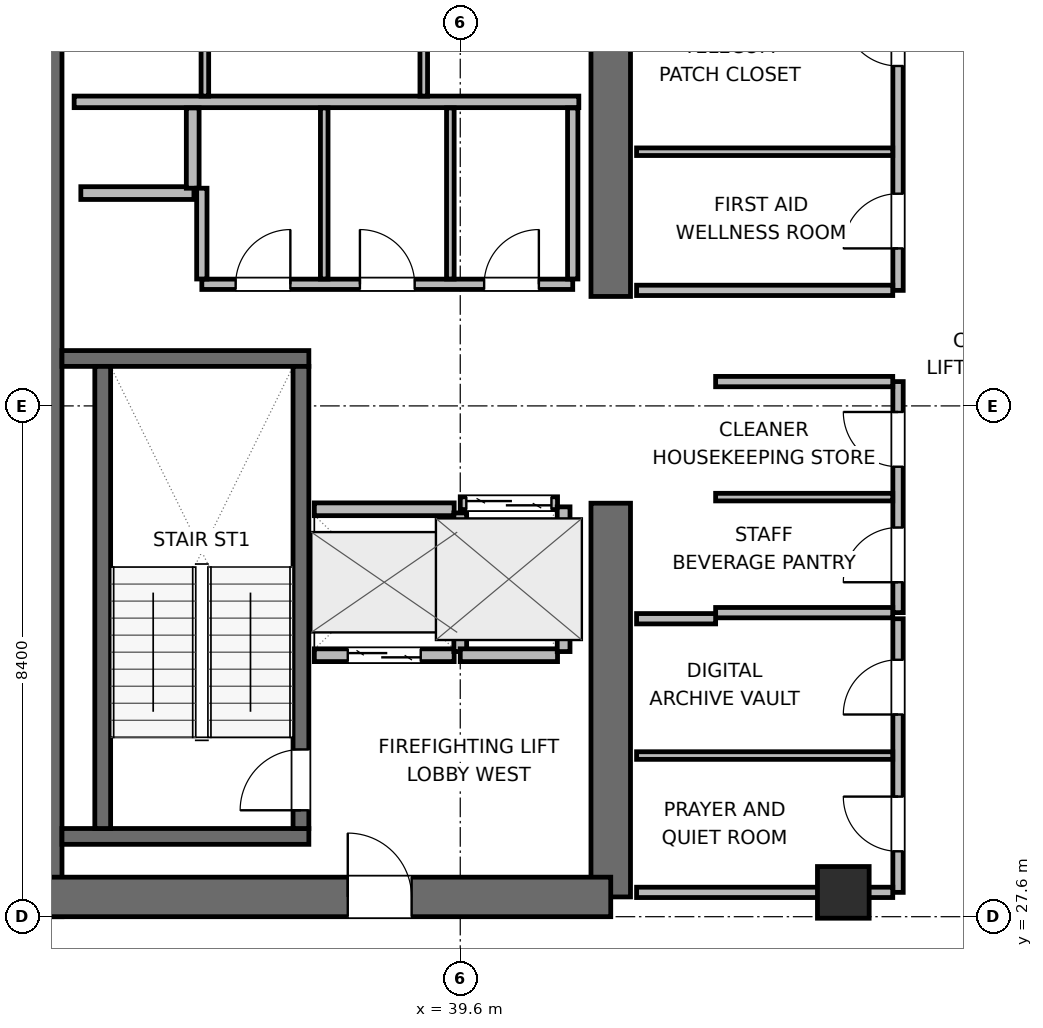
"""IFC4 building model, lengths in metres.
Left out: names, types, materials, properties, quantities, classifications, styles, units other than length and angle.
Written with IfcOpenShell. Run it as: python <this file> out.ifc"""

import sys

from ifc_helpers import new_model, si_unit, direction, frame, frame_2d, origin, origin_2d, place, context, subcontext, project, spatial, rectangle, extrude, element, fill, save


model = new_model("IFC4")
c1 = context("Model", 3, precision=1e-05, world=origin(), true_north=direction((0.0, 1.0)))
c2 = subcontext(c1, "Body", "Model", "MODEL_VIEW")
j1 = project(units=[si_unit("LENGTHUNIT", "METRE"), si_unit("PLANEANGLEUNIT", "RADIAN")], contexts=[c1])
p1 = place(None, origin())
s1 = spatial("IfcSite", under=j1, at=p1, CompositionType="ELEMENT")
p2 = place(p1, origin())
s2 = spatial("IfcBuilding", under=s1, at=p2, CompositionType="ELEMENT")
p3 = place(p2, frame((0.0, 0.0, 247.2)))
s3 = spatial("IfcBuildingStorey", under=s2, at=p3, CompositionType="ELEMENT", Elevation=247.2)
p4 = place(p3, frame((32.725, 27.6, 0.0), z_axis=(0.0, 0.0, 1.0), x_axis=(0.0, 1.0, 0.0)))
e1 = element("IfcWall", 1, at=p4, inside=s3, PredefinedType="SHEAR", context=c2, shape_type="SweptSolid", body=[
    extrude(rectangle(XDim=16.8, YDim=0.65, at=frame_2d((8.4, 0.0))), origin(), (0.0, 0.0, 1.0), 3.9),
])
p5 = place(p3, frame((42.075, 27.925, 0.0), z_axis=(0.0, 0.0, 1.0), x_axis=(0.0, 1.0, 0.0)))
e2 = element("IfcWall", 2, at=p5, inside=s3, PredefinedType="SHEAR", context=c2, shape_type="SweptSolid", body=[
    extrude(rectangle(XDim=6.475, YDim=0.65, at=frame_2d((3.237, 0.0))), origin(), (0.0, 0.0, 1.0), 3.9),
])
p6 = place(p3, frame((42.075, 37.8, 0.0), z_axis=(0.0, 0.0, 1.0), x_axis=(0.0, 1.0, 0.0)))
e3 = element("IfcWall", 3, at=p6, inside=s3, PredefinedType="SHEAR", context=c2, shape_type="SweptSolid", body=[
    extrude(rectangle(XDim=6.275, YDim=0.65, at=frame_2d((3.137, 0.0))), origin(), (0.0, 0.0, 1.0), 3.9),
])
p7 = place(p3, frame((32.725, 27.925, 0.0), z_axis=(0.0, 0.0, 1.0), x_axis=(1.0, 0.0, 0.0)))
e4 = element("IfcWall", 4, at=p7, inside=s3, PredefinedType="SHEAR", context=c2, shape_type="SweptSolid", body=[
    extrude(rectangle(XDim=9.35, YDim=0.65, at=frame_2d((4.675, 0.0))), origin(), (0.0, 0.0, 1.0), 3.9),
])
p8 = place(p7, frame((5.025, 0.0, 0.0)))
e5 = element("IfcOpeningElement", 5, at=p8, cuts=e4, PredefinedType="OPENING", context=c2, shape_type="SweptSolid", body=[
    extrude(rectangle(XDim=1.05, YDim=2.04, at=frame_2d((0.525, 1.02))), frame((0.0, 0.335, 0.0), z_axis=(0.0, -1.0, 0.0), x_axis=(1.0, 0.0, 0.0)), (0.0, 0.0, 1.0), 0.67),
])
for number, where, z_axis, x_axis in (
    (6, (33.05, 28.92, 0.0), (0.0, 0.0, 1.0), (1.0, 0.0, 0.0)),
    (7, (33.05, 36.78, 0.0), (0.0, 0.0, 1.0), (1.0, 0.0, 0.0)),
):
    element("IfcWall", number, at=place(p3, frame(where, z_axis=z_axis, x_axis=x_axis)), inside=s3, PredefinedType="SHEAR", context=c2, shape_type="SweptSolid", body=[
        extrude(rectangle(XDim=4.06, YDim=0.26, at=frame_2d((2.03, 0.0))), origin(), (0.0, 0.0, 1.0), 3.9),
    ])
p9 = place(p3, frame((33.72, 29.05, 0.0), z_axis=(0.0, 0.0, 1.0), x_axis=(0.0, 1.0, 0.0)))
e8 = element("IfcWall", 8, at=p9, inside=s3, PredefinedType="SHEAR", context=c2, shape_type="SweptSolid", body=[
    extrude(rectangle(XDim=7.6, YDim=0.26, at=frame_2d((3.8, 0.0))), origin(), (0.0, 0.0, 1.0), 3.9),
])
p10 = place(p3, frame((36.98, 29.05, 0.0), z_axis=(0.0, 0.0, 1.0), x_axis=(0.0, 1.0, 0.0)))
e9 = element("IfcWall", 9, at=p10, inside=s3, PredefinedType="SHEAR", context=c2, shape_type="SweptSolid", body=[
    extrude(rectangle(XDim=7.6, YDim=0.26, at=frame_2d((3.8, 0.0))), origin(), (0.0, 0.0, 1.0), 3.9),
])
p11 = place(p10, frame((0.3, 0.0, 0.0)))
e10 = element("IfcOpeningElement", 10, at=p11, cuts=e9, PredefinedType="OPENING", context=c2, shape_type="SweptSolid", body=[
    extrude(rectangle(XDim=1.0, YDim=2.04, at=frame_2d((0.5, 1.02))), frame((0.0, 0.14, 0.0), z_axis=(0.0, -1.0, 0.0), x_axis=(1.0, 0.0, 0.0)), (0.0, 0.0, 1.0), 0.28),
])
p12 = place(p3, frame((45.9, 28.0, 0.0), z_axis=(0.0, 0.0, 1.0), x_axis=(1.0, 0.0, 0.0)))
e11 = element("IfcColumn", 11, at=p12, inside=s3, PredefinedType="COLUMN", context=c2, shape_type="SweptSolid", body=[
    extrude(rectangle(XDim=0.85, YDim=0.85, at=origin_2d()), origin(), (0.0, 0.0, 1.0), 3.9),
])
p13 = place(p3, frame((33.25, 41.0, 0.0), z_axis=(0.0, 0.0, 1.0), x_axis=(1.0, 0.0, 0.0)))
e12 = element("IfcWall", 12, at=p13, inside=s3, PredefinedType="PLUMBINGWALL", context=c2, shape_type="SweptSolid", body=[
    extrude(rectangle(XDim=8.3, YDim=0.19, at=frame_2d((4.15, 0.0))), origin(), (0.0, 0.0, 1.0), 3.68),
])
for number, where, z_axis, x_axis in (
    (13, (35.4, 41.095, 0.0), (0.0, 0.0, 1.0), (0.0, 1.0, 0.0)),
    (14, (39.0, 41.095, 0.0), (0.0, 0.0, 1.0), (0.0, 1.0, 0.0)),
):
    element("IfcWall", number, at=place(p3, frame(where, z_axis=z_axis, x_axis=x_axis)), inside=s3, PredefinedType="PARTITIONING", context=c2, shape_type="SweptSolid", body=[
        extrude(rectangle(XDim=2.455, YDim=0.125, at=frame_2d((1.228, 0.0))), origin(), (0.0, 0.0, 1.0), 3.68),
    ])
p14 = place(p3, frame((33.36, 39.5, 0.0), z_axis=(0.0, 0.0, 1.0), x_axis=(1.0, 0.0, 0.0)))
e15 = element("IfcWall", 15, at=p14, inside=s3, PredefinedType="PARTITIONING", context=c2, shape_type="SweptSolid", body=[
    extrude(rectangle(XDim=1.86, YDim=0.21, at=frame_2d((0.93, 0.0))), origin(), (0.0, 0.0, 1.0), 3.68),
])
p15 = place(p3, frame((35.2, 39.58, 0.0), z_axis=(0.0, 0.0, 1.0), x_axis=(0.0, 1.0, 0.0)))
e16 = element("IfcWall", 16, at=p15, inside=s3, PredefinedType="PARTITIONING", context=c2, shape_type="SweptSolid", body=[
    extrude(rectangle(XDim=1.32, YDim=0.21, at=frame_2d((0.66, 0.0))), origin(), (0.0, 0.0, 1.0), 3.68),
])
p16 = place(p3, frame((37.2, 31.9, 0.0), z_axis=(0.0, 0.0, 1.0), x_axis=(1.0, 0.0, 0.0)))
e17 = element("IfcWall", 17, at=p16, inside=s3, PredefinedType="PARTITIONING", context=c2, shape_type="SweptSolid", body=[
    extrude(rectangle(XDim=2.3, YDim=0.21, at=frame_2d((1.15, 0.0))), origin(), (0.0, 0.0, 1.0), 3.68),
])
p17 = place(p16, frame((0.55, 0.0, 0.0)))
e18 = element("IfcOpeningElement", 18, at=p17, cuts=e17, PredefinedType="OPENING", context=c2, shape_type="SweptSolid", body=[
    extrude(rectangle(XDim=1.2, YDim=2.04, at=frame_2d((0.6, 1.02))), frame((0.0, 0.115, 0.0), z_axis=(0.0, -1.0, 0.0), x_axis=(1.0, 0.0, 0.0)), (0.0, 0.0, 1.0), 0.23),
])
p18 = place(p3, frame((37.2, 34.3, 0.0), z_axis=(0.0, 0.0, 1.0), x_axis=(1.0, 0.0, 0.0)))
e19 = element("IfcWall", 19, at=p18, inside=s3, PredefinedType="PARTITIONING", context=c2, shape_type="SweptSolid", body=[
    extrude(rectangle(XDim=2.3, YDim=0.21, at=frame_2d((1.15, 0.0))), origin(), (0.0, 0.0, 1.0), 3.68),
])
p19 = place(p3, frame((39.6, 31.96, 0.0), z_axis=(0.0, 0.0, 1.0), x_axis=(0.0, 1.0, 0.0)))
e20 = element("IfcWall", 20, at=p19, inside=s3, PredefinedType="PARTITIONING", context=c2, shape_type="SweptSolid", body=[
    extrude(rectangle(XDim=2.28, YDim=0.21, at=frame_2d((1.14, 0.0))), origin(), (0.0, 0.0, 1.0), 3.68),
])
p20 = place(p3, frame((39.6, 34.4, 0.0), z_axis=(0.0, 0.0, 1.0), x_axis=(1.0, 0.0, 0.0)))
e21 = element("IfcWall", 21, at=p20, inside=s3, PredefinedType="PARTITIONING", context=c2, shape_type="SweptSolid", body=[
    extrude(rectangle(XDim=1.6, YDim=0.21, at=frame_2d((0.8, 0.0))), origin(), (0.0, 0.0, 1.0), 3.68),
])
p21 = place(p20, frame((0.1, 0.0, 0.0)))
e22 = element("IfcOpeningElement", 22, at=p21, cuts=e21, PredefinedType="OPENING", context=c2, shape_type="SweptSolid", body=[
    extrude(rectangle(XDim=1.4, YDim=2.06, at=frame_2d((0.7, 1.03))), frame((0.0, 0.115, 0.0), z_axis=(0.0, -1.0, 0.0), x_axis=(1.0, 0.0, 0.0)), (0.0, 0.0, 1.0), 0.23),
])
p22 = place(p3, frame((39.6, 31.9, 0.0), z_axis=(0.0, 0.0, 1.0), x_axis=(1.0, 0.0, 0.0)))
e23 = element("IfcWall", 23, at=p22, inside=s3, PredefinedType="PARTITIONING", context=c2, shape_type="SweptSolid", body=[
    extrude(rectangle(XDim=1.6, YDim=0.21, at=frame_2d((0.8, 0.0))), origin(), (0.0, 0.0, 1.0), 3.68),
])
p23 = place(p3, frame((41.3, 31.96, 0.0), z_axis=(0.0, 0.0, 1.0), x_axis=(0.0, 1.0, 0.0)))
e24 = element("IfcWall", 24, at=p23, inside=s3, PredefinedType="PARTITIONING", context=c2, shape_type="SweptSolid", body=[
    extrude(rectangle(XDim=2.38, YDim=0.21, at=frame_2d((1.19, 0.0))), origin(), (0.0, 0.0, 1.0), 3.68),
])
p24 = place(p3, frame((35.35, 38.0, 0.0), z_axis=(0.0, 0.0, 1.0), x_axis=(1.0, 0.0, 0.0)))
e25 = element("IfcWall", 25, at=p24, inside=s3, PredefinedType="PARTITIONING", context=c2, shape_type="SweptSolid", body=[
    extrude(rectangle(XDim=6.1, YDim=0.17, at=frame_2d((3.05, 0.0))), origin(), (0.0, 0.0, 1.0), 3.68),
])
p25 = place(p24, frame((0.556, 0.0, 0.0)))
e26 = element("IfcOpeningElement", 26, at=p25, cuts=e25, PredefinedType="OPENING", context=c2, shape_type="SweptSolid", body=[
    extrude(rectangle(XDim=0.9, YDim=2.02, at=frame_2d((0.45, 1.01))), frame((0.0, 0.095, 0.0), z_axis=(0.0, -1.0, 0.0), x_axis=(1.0, 0.0, 0.0)), (0.0, 0.0, 1.0), 0.19),
])
p26 = place(p24, frame((2.6, 0.0, 0.0)))
e27 = element("IfcOpeningElement", 27, at=p26, cuts=e25, PredefinedType="OPENING", context=c2, shape_type="SweptSolid", body=[
    extrude(rectangle(XDim=0.9, YDim=2.02, at=frame_2d((0.45, 1.01))), frame((0.0, 0.095, 0.0), z_axis=(0.0, -1.0, 0.0), x_axis=(1.0, 0.0, 0.0)), (0.0, 0.0, 1.0), 0.19),
])
p27 = place(p24, frame((4.643, 0.0, 0.0)))
e28 = element("IfcOpeningElement", 28, at=p27, cuts=e25, PredefinedType="OPENING", context=c2, shape_type="SweptSolid", body=[
    extrude(rectangle(XDim=0.9, YDim=2.02, at=frame_2d((0.45, 1.01))), frame((0.0, 0.095, 0.0), z_axis=(0.0, -1.0, 0.0), x_axis=(1.0, 0.0, 0.0)), (0.0, 0.0, 1.0), 0.19),
])
p28 = place(p3, frame((35.35, 38.087, 0.0), z_axis=(0.0, 0.0, 1.0), x_axis=(0.0, 1.0, 0.0)))
e29 = element("IfcWall", 29, at=p28, inside=s3, PredefinedType="PARTITIONING", context=c2, shape_type="SweptSolid", body=[
    extrude(rectangle(XDim=1.493, YDim=0.17, at=frame_2d((0.747, 0.0))), origin(), (0.0, 0.0, 1.0), 3.68),
])
p29 = place(p3, frame((41.45, 38.087, 0.0), z_axis=(0.0, 0.0, 1.0), x_axis=(0.0, 1.0, 0.0)))
e30 = element("IfcWall", 30, at=p29, inside=s3, PredefinedType="PARTITIONING", context=c2, shape_type="SweptSolid", body=[
    extrude(rectangle(XDim=2.813, YDim=0.17, at=frame_2d((1.406, 0.0))), origin(), (0.0, 0.0, 1.0), 3.68),
])
for number, where, z_axis, x_axis in (
    (31, (37.363, 38.087, 0.0), (0.0, 0.0, 1.0), (0.0, 1.0, 0.0)),
    (32, (39.437, 38.087, 0.0), (0.0, 0.0, 1.0), (0.0, 1.0, 0.0)),
):
    element("IfcWall", number, at=place(p3, frame(where, z_axis=z_axis, x_axis=x_axis)), inside=s3, PredefinedType="PARTITIONING", context=c2, shape_type="SweptSolid", body=[
        extrude(rectangle(XDim=2.813, YDim=0.125, at=frame_2d((1.406, 0.0))), origin(), (0.0, 0.0, 1.0), 3.68),
    ])
p30 = place(p3, frame((46.8, 32.6, 0.0), z_axis=(0.0, 0.0, 1.0), x_axis=(0.0, 1.0, 0.0)))
e33 = element("IfcWall", 33, at=p30, inside=s3, PredefinedType="PARTITIONING", context=c2, shape_type="SweptSolid", body=[
    extrude(rectangle(XDim=3.8, YDim=0.17, at=frame_2d((1.9, 0.0))), origin(), (0.0, 0.0, 1.0), 3.68),
])
p31 = place(p30, frame((0.5, 0.0, 0.0)))
e34 = element("IfcOpeningElement", 34, at=p31, cuts=e33, PredefinedType="OPENING", context=c2, shape_type="SweptSolid", body=[
    extrude(rectangle(XDim=0.9, YDim=2.02, at=frame_2d((0.45, 1.01))), frame((0.0, 0.095, 0.0), z_axis=(0.0, -1.0, 0.0), x_axis=(1.0, 0.0, 0.0)), (0.0, 0.0, 1.0), 0.19),
])
p32 = place(p30, frame((2.4, 0.0, 0.0)))
e35 = element("IfcOpeningElement", 35, at=p32, cuts=e33, PredefinedType="OPENING", context=c2, shape_type="SweptSolid", body=[
    extrude(rectangle(XDim=0.9, YDim=2.02, at=frame_2d((0.45, 1.01))), frame((0.0, 0.095, 0.0), z_axis=(0.0, -1.0, 0.0), x_axis=(1.0, 0.0, 0.0)), (0.0, 0.0, 1.0), 0.19),
])
for number, where, z_axis, x_axis in (
    (36, (43.8, 32.6, 0.0), (0.0, 0.0, 1.0), (1.0, 0.0, 0.0)),
    (37, (43.8, 36.4, 0.0), (0.0, 0.0, 1.0), (1.0, 0.0, 0.0)),
):
    element("IfcWall", number, at=place(p3, frame(where, z_axis=z_axis, x_axis=x_axis)), inside=s3, PredefinedType="PARTITIONING", context=c2, shape_type="SweptSolid", body=[
        extrude(rectangle(XDim=2.913, YDim=0.17, at=frame_2d((1.457, 0.0))), origin(), (0.0, 0.0, 1.0), 3.68),
    ])
p33 = place(p3, frame((43.8, 34.5, 0.0), z_axis=(0.0, 0.0, 1.0), x_axis=(1.0, 0.0, 0.0)))
e38 = element("IfcWall", 38, at=p33, inside=s3, PredefinedType="PARTITIONING", context=c2, shape_type="SweptSolid", body=[
    extrude(rectangle(XDim=2.913, YDim=0.125, at=frame_2d((1.457, 0.0))), origin(), (0.0, 0.0, 1.0), 3.68),
])
p34 = place(p3, frame((46.8, 28.0, 0.0), z_axis=(0.0, 0.0, 1.0), x_axis=(0.0, 1.0, 0.0)))
e39 = element("IfcWall", 39, at=p34, inside=s3, PredefinedType="PARTITIONING", context=c2, shape_type="SweptSolid", body=[
    extrude(rectangle(XDim=4.5, YDim=0.17, at=frame_2d((2.25, 0.0))), origin(), (0.0, 0.0, 1.0), 3.68),
])
p35 = place(p34, frame((0.675, 0.0, 0.0)))
e40 = element("IfcOpeningElement", 40, at=p35, cuts=e39, PredefinedType="OPENING", context=c2, shape_type="SweptSolid", body=[
    extrude(rectangle(XDim=0.9, YDim=2.02, at=frame_2d((0.45, 1.01))), frame((0.0, 0.095, 0.0), z_axis=(0.0, -1.0, 0.0), x_axis=(1.0, 0.0, 0.0)), (0.0, 0.0, 1.0), 0.19),
])
p36 = place(p34, frame((2.925, 0.0, 0.0)))
e41 = element("IfcOpeningElement", 41, at=p36, cuts=e39, PredefinedType="OPENING", context=c2, shape_type="SweptSolid", body=[
    extrude(rectangle(XDim=0.9, YDim=2.02, at=frame_2d((0.45, 1.01))), frame((0.0, 0.095, 0.0), z_axis=(0.0, -1.0, 0.0), x_axis=(1.0, 0.0, 0.0)), (0.0, 0.0, 1.0), 0.19),
])
p37 = place(p3, frame((42.5, 28.0, 0.0), z_axis=(0.0, 0.0, 1.0), x_axis=(1.0, 0.0, 0.0)))
e42 = element("IfcWall", 42, at=p37, inside=s3, PredefinedType="PARTITIONING", context=c2, shape_type="SweptSolid", body=[
    extrude(rectangle(XDim=4.213, YDim=0.17, at=frame_2d((2.106, 0.0))), origin(), (0.0, 0.0, 1.0), 2.765),
])
p38 = place(p3, frame((42.5, 32.5, 0.0), z_axis=(0.0, 0.0, 1.0), x_axis=(1.0, 0.0, 0.0)))
e43 = element("IfcWall", 43, at=p38, inside=s3, PredefinedType="PARTITIONING", context=c2, shape_type="SweptSolid", body=[
    extrude(rectangle(XDim=1.3, YDim=0.17, at=frame_2d((0.65, 0.0))), origin(), (0.0, 0.0, 1.0), 3.68),
])
p39 = place(p3, frame((42.5, 30.25, 0.0), z_axis=(0.0, 0.0, 1.0), x_axis=(1.0, 0.0, 0.0)))
e44 = element("IfcWall", 44, at=p39, inside=s3, PredefinedType="PARTITIONING", context=c2, shape_type="SweptSolid", body=[
    extrude(rectangle(XDim=4.213, YDim=0.125, at=frame_2d((2.106, 0.0))), origin(), (0.0, 0.0, 1.0), 3.68),
])
p40 = place(p3, frame((46.8, 37.9, 0.0), z_axis=(0.0, 0.0, 1.0), x_axis=(0.0, 1.0, 0.0)))
e45 = element("IfcWall", 45, at=p40, inside=s3, PredefinedType="PARTITIONING", context=c2, shape_type="SweptSolid", body=[
    extrude(rectangle(XDim=6.0, YDim=0.17, at=frame_2d((3.0, 0.0))), origin(), (0.0, 0.0, 1.0), 3.68),
])
p41 = place(p40, frame((0.69, 0.0, 0.0)))
e46 = element("IfcOpeningElement", 46, at=p41, cuts=e45, PredefinedType="OPENING", context=c2, shape_type="SweptSolid", body=[
    extrude(rectangle(XDim=0.9, YDim=2.02, at=frame_2d((0.45, 1.01))), frame((0.0, 0.095, 0.0), z_axis=(0.0, -1.0, 0.0), x_axis=(1.0, 0.0, 0.0)), (0.0, 0.0, 1.0), 0.19),
])
p42 = place(p40, frame((3.69, 0.0, 0.0)))
e47 = element("IfcOpeningElement", 47, at=p42, cuts=e45, PredefinedType="OPENING", context=c2, shape_type="SweptSolid", body=[
    extrude(rectangle(XDim=0.9, YDim=2.02, at=frame_2d((0.45, 1.01))), frame((0.0, 0.095, 0.0), z_axis=(0.0, -1.0, 0.0), x_axis=(1.0, 0.0, 0.0)), (0.0, 0.0, 1.0), 0.19),
])
p43 = place(p3, frame((42.5, 37.9, 0.0), z_axis=(0.0, 0.0, 1.0), x_axis=(1.0, 0.0, 0.0)))
e48 = element("IfcWall", 48, at=p43, inside=s3, PredefinedType="PARTITIONING", context=c2, shape_type="SweptSolid", body=[
    extrude(rectangle(XDim=4.213, YDim=0.17, at=frame_2d((2.106, 0.0))), origin(), (0.0, 0.0, 1.0), 3.68),
])
p44 = place(p3, frame((42.5, 40.18, 0.0), z_axis=(0.0, 0.0, 1.0), x_axis=(1.0, 0.0, 0.0)))
e49 = element("IfcWall", 49, at=p44, inside=s3, PredefinedType="PARTITIONING", context=c2, shape_type="SweptSolid", body=[
    extrude(rectangle(XDim=4.213, YDim=0.125, at=frame_2d((2.106, 0.0))), origin(), (0.0, 0.0, 1.0), 3.68),
])
p45 = place(p11, origin())
e50 = element("IfcDoor", 50, at=p45, inside=s3, OperationType="SINGLE_SWING_LEFT", PredefinedType="DOOR", context=c2, shape_type="SweptSolid", body=[
    extrude(rectangle(XDim=1.0, YDim=2.04, at=frame_2d((0.5, 1.02))), frame((0.0, 0.025, 0.0), z_axis=(0.0, -1.0, 0.0), x_axis=(1.0, 0.0, 0.0)), (0.0, 0.0, 1.0), 0.05),
])
fill(e10, e50)
p46 = place(p17, origin())
e51 = element("IfcDoor", 51, at=p46, inside=s3, OperationType="DOUBLE_DOOR_SLIDING", PredefinedType="DOOR", context=c2, shape_type="SweptSolid", body=[
    extrude(rectangle(XDim=1.2, YDim=2.04, at=frame_2d((0.6, 1.02))), frame((0.0, 0.025, 0.0), z_axis=(0.0, -1.0, 0.0), x_axis=(1.0, 0.0, 0.0)), (0.0, 0.0, 1.0), 0.05),
])
fill(e18, e51)
p47 = place(p21, origin())
e52 = element("IfcDoor", 52, at=p47, inside=s3, OperationType="DOUBLE_DOOR_SLIDING", PredefinedType="DOOR", context=c2, shape_type="SweptSolid", body=[
    extrude(rectangle(XDim=1.4, YDim=2.06, at=frame_2d((0.7, 1.03))), frame((0.0, 0.025, 0.0), z_axis=(0.0, -1.0, 0.0), x_axis=(1.0, 0.0, 0.0)), (0.0, 0.0, 1.0), 0.05),
])
fill(e22, e52)
p48 = place(p8, origin())
e53 = element("IfcDoor", 53, at=p48, inside=s3, OperationType="SINGLE_SWING_LEFT", PredefinedType="DOOR", context=c2, shape_type="SweptSolid", body=[
    extrude(rectangle(XDim=1.05, YDim=2.04, at=frame_2d((0.525, 1.02))), frame((0.0, 0.025, 0.0), z_axis=(0.0, -1.0, 0.0), x_axis=(1.0, 0.0, 0.0)), (0.0, 0.0, 1.0), 0.05),
])
fill(e5, e53)
p49 = place(p25, origin())
e54 = element("IfcDoor", 54, at=p49, inside=s3, OperationType="SINGLE_SWING_RIGHT", PredefinedType="DOOR", context=c2, shape_type="SweptSolid", body=[
    extrude(rectangle(XDim=0.9, YDim=2.02, at=frame_2d((0.45, 1.01))), frame((0.0, 0.025, 0.0), z_axis=(0.0, -1.0, 0.0), x_axis=(1.0, 0.0, 0.0)), (0.0, 0.0, 1.0), 0.05),
])
fill(e26, e54)
p50 = place(p26, origin())
e55 = element("IfcDoor", 55, at=p50, inside=s3, OperationType="SINGLE_SWING_LEFT", PredefinedType="DOOR", context=c2, shape_type="SweptSolid", body=[
    extrude(rectangle(XDim=0.9, YDim=2.02, at=frame_2d((0.45, 1.01))), frame((0.0, 0.025, 0.0), z_axis=(0.0, -1.0, 0.0), x_axis=(1.0, 0.0, 0.0)), (0.0, 0.0, 1.0), 0.05),
])
fill(e27, e55)
p51 = place(p27, origin())
e56 = element("IfcDoor", 56, at=p51, inside=s3, OperationType="SINGLE_SWING_RIGHT", PredefinedType="DOOR", context=c2, shape_type="SweptSolid", body=[
    extrude(rectangle(XDim=0.9, YDim=2.02, at=frame_2d((0.45, 1.01))), frame((0.0, 0.025, 0.0), z_axis=(0.0, -1.0, 0.0), x_axis=(1.0, 0.0, 0.0)), (0.0, 0.0, 1.0), 0.05),
])
fill(e28, e56)
p52 = place(p31, origin())
e57 = element("IfcDoor", 57, at=p52, inside=s3, OperationType="SINGLE_SWING_LEFT", PredefinedType="DOOR", context=c2, shape_type="SweptSolid", body=[
    extrude(rectangle(XDim=0.9, YDim=2.02, at=frame_2d((0.45, 1.01))), frame((0.0, 0.025, 0.0), z_axis=(0.0, -1.0, 0.0), x_axis=(1.0, 0.0, 0.0)), (0.0, 0.0, 1.0), 0.05),
])
fill(e34, e57)
p53 = place(p32, origin())
e58 = element("IfcDoor", 58, at=p53, inside=s3, OperationType="SINGLE_SWING_RIGHT", PredefinedType="DOOR", context=c2, shape_type="SweptSolid", body=[
    extrude(rectangle(XDim=0.9, YDim=2.02, at=frame_2d((0.45, 1.01))), frame((0.0, 0.025, 0.0), z_axis=(0.0, -1.0, 0.0), x_axis=(1.0, 0.0, 0.0)), (0.0, 0.0, 1.0), 0.05),
])
fill(e35, e58)
p54 = place(p35, origin())
e59 = element("IfcDoor", 59, at=p54, inside=s3, OperationType="SINGLE_SWING_RIGHT", PredefinedType="DOOR", context=c2, shape_type="SweptSolid", body=[
    extrude(rectangle(XDim=0.9, YDim=2.02, at=frame_2d((0.45, 1.01))), frame((0.0, 0.025, 0.0), z_axis=(0.0, -1.0, 0.0), x_axis=(1.0, 0.0, 0.0)), (0.0, 0.0, 1.0), 0.05),
])
fill(e40, e59)
p55 = place(p36, origin())
e60 = element("IfcDoor", 60, at=p55, inside=s3, OperationType="SINGLE_SWING_LEFT", PredefinedType="DOOR", context=c2, shape_type="SweptSolid", body=[
    extrude(rectangle(XDim=0.9, YDim=2.02, at=frame_2d((0.45, 1.01))), frame((0.0, 0.025, 0.0), z_axis=(0.0, -1.0, 0.0), x_axis=(1.0, 0.0, 0.0)), (0.0, 0.0, 1.0), 0.05),
])
fill(e41, e60)
p56 = place(p41, origin())
e61 = element("IfcDoor", 61, at=p56, inside=s3, OperationType="SINGLE_SWING_LEFT", PredefinedType="DOOR", context=c2, shape_type="SweptSolid", body=[
    extrude(rectangle(XDim=0.9, YDim=2.02, at=frame_2d((0.45, 1.01))), frame((0.0, 0.025, 0.0), z_axis=(0.0, -1.0, 0.0), x_axis=(1.0, 0.0, 0.0)), (0.0, 0.0, 1.0), 0.05),
])
fill(e46, e61)
p57 = place(p42, origin())
e62 = element("IfcDoor", 62, at=p57, inside=s3, OperationType="SINGLE_SWING_RIGHT", PredefinedType="DOOR", context=c2, shape_type="SweptSolid", body=[
    extrude(rectangle(XDim=0.9, YDim=2.02, at=frame_2d((0.45, 1.01))), frame((0.0, 0.025, 0.0), z_axis=(0.0, -1.0, 0.0), x_axis=(1.0, 0.0, 0.0)), (0.0, 0.0, 1.0), 0.05),
])
fill(e47, e62)
save(model, sys.argv[1])
